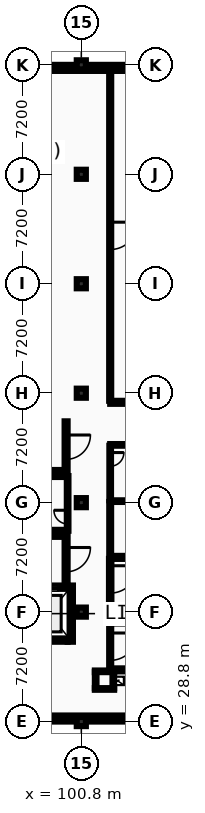
"""IFC4 building model, lengths in metres.
Left out: names, types, materials, properties, quantities, classifications, styles, units other than length and angle.
Written with IfcOpenShell. Run it as: python <this file> out.ifc"""

import sys

from ifc_helpers import new_model, si_unit, direction, frame, frame_2d, origin, origin_2d, place, context, subcontext, project, spatial, rectangle, extrude, element, fill, save


model = new_model("IFC4")
c1 = context("Model", 3, precision=1e-05, world=origin(), true_north=direction((0.0, 1.0)))
c2 = subcontext(c1, "Body", "Model", "MODEL_VIEW")
j1 = project(units=[si_unit("LENGTHUNIT", "METRE"), si_unit("PLANEANGLEUNIT", "RADIAN")], contexts=[c1])
p1 = place(None, origin())
s1 = spatial("IfcSite", under=j1, at=p1, CompositionType="ELEMENT")
p2 = place(p1, origin())
s2 = spatial("IfcBuilding", under=s1, at=p2, CompositionType="ELEMENT")
p3 = place(p2, frame((0.0, 0.0, -4.8)))
s3 = spatial("IfcBuildingStorey", under=s2, at=p3, CompositionType="ELEMENT", Elevation=-4.8)
for number, where, z_axis, x_axis in (
    (1, (100.8, 28.8, 0.0), (0.0, 0.0, 1.0), (1.0, 0.0, 0.0)),
    (2, (100.8, 36.0, 0.0), (0.0, 0.0, 1.0), (1.0, 0.0, 0.0)),
    (3, (100.8, 43.2, 0.0), (0.0, 0.0, 1.0), (1.0, 0.0, 0.0)),
    (4, (100.8, 50.4, 0.0), (0.0, 0.0, 1.0), (1.0, 0.0, 0.0)),
    (5, (100.8, 57.6, 0.0), (0.0, 0.0, 1.0), (1.0, 0.0, 0.0)),
    (6, (100.8, 64.8, 0.0), (0.0, 0.0, 1.0), (1.0, 0.0, 0.0)),
    (7, (100.8, 72.0, 0.0), (0.0, 0.0, 1.0), (1.0, 0.0, 0.0)),
):
    element("IfcColumn", number, at=place(p3, frame(where, z_axis=z_axis, x_axis=x_axis)), inside=s3, PredefinedType="COLUMN", context=c2, shape_type="SweptSolid", body=[
        extrude(rectangle(XDim=0.6, YDim=0.6, at=origin_2d()), origin(), (0.0, 0.0, 1.0), 4.8),
    ])
p4 = place(p3, frame((86.0, 29.0, 0.0), z_axis=(0.0, 0.0, 1.0), x_axis=(1.0, 0.0, 0.0)))
e8 = element("IfcWall", 8, at=p4, inside=s3, PredefinedType="USERDEFINED", context=c2, shape_type="SweptSolid", body=[
    extrude(rectangle(XDim=36.4, YDim=0.4, at=frame_2d((18.2, 0.0))), origin(), (0.0, 0.0, 1.0), 4.545),
])
p5 = place(p3, frame((122.4, 71.8, 0.0), z_axis=(0.0, 0.0, 1.0), x_axis=(-1.0, 0.0, 0.0)))
e9 = element("IfcWall", 9, at=p5, inside=s3, PredefinedType="USERDEFINED", context=c2, shape_type="SweptSolid", body=[
    extrude(rectangle(XDim=29.2, YDim=0.4, at=frame_2d((14.6, 0.0))), origin(), (0.0, 0.0, 1.0), 4.545),
])
p6 = place(p3, frame((97.45, 34.225, 0.0), z_axis=(0.0, 0.0, 1.0), x_axis=(1.0, 0.0, 0.0)))
e10 = element("IfcWall", 10, at=p6, inside=s3, PredefinedType="SHEAR", context=c2, shape_type="SweptSolid", body=[
    extrude(rectangle(XDim=2.45, YDim=0.35, at=frame_2d((1.225, 0.0))), origin(), (0.0, 0.0, 1.0), 4.545),
])
p7 = place(p3, frame((97.45, 37.575, 0.0), z_axis=(0.0, 0.0, 1.0), x_axis=(1.0, 0.0, 0.0)))
e11 = element("IfcWall", 11, at=p7, inside=s3, PredefinedType="SHEAR", context=c2, shape_type="SweptSolid", body=[
    extrude(rectangle(XDim=2.45, YDim=0.35, at=frame_2d((1.225, 0.0))), origin(), (0.0, 0.0, 1.0), 4.545),
])
p8 = place(p7, frame((0.625, 0.0, 0.0)))
e12 = element("IfcOpeningElement", 12, at=p8, cuts=e11, PredefinedType="OPENING", context=c2, shape_type="SweptSolid", body=[
    extrude(rectangle(XDim=1.2, YDim=2.2, at=frame_2d((0.6, 1.1))), frame((0.0, 0.185, 0.0), z_axis=(0.0, -1.0, 0.0), x_axis=(1.0, 0.0, 0.0)), (0.0, 0.0, 1.0), 0.37),
])
p9 = place(p3, frame((100.075, 34.05, 0.0), z_axis=(0.0, 0.0, 1.0), x_axis=(0.0, 1.0, 0.0)))
e13 = element("IfcWall", 13, at=p9, inside=s3, PredefinedType="SHEAR", context=c2, shape_type="SweptSolid", body=[
    extrude(rectangle(XDim=3.7, YDim=0.35, at=frame_2d((1.85, 0.0))), origin(), (0.0, 0.0, 1.0), 4.545),
])
p10 = place(p3, frame((99.8, 37.75, 0.0), z_axis=(0.0, 0.0, 1.0), x_axis=(0.0, 1.0, 0.0)))
e14 = element("IfcWall", 14, at=p10, inside=s3, PredefinedType="PARTITIONING", context=c2, shape_type="SweptSolid", body=[
    extrude(rectangle(XDim=3.4, YDim=0.2, at=frame_2d((1.7, 0.0))), origin(), (0.0, 0.0, 1.0), 4.545),
])
p11 = place(p10, frame((0.9, 0.0, 0.0)))
e15 = element("IfcOpeningElement", 15, at=p11, cuts=e14, PredefinedType="OPENING", context=c2, shape_type="SweptSolid", body=[
    extrude(rectangle(XDim=1.6, YDim=2.2, at=frame_2d((0.8, 1.1))), frame((0.0, 0.11, 0.0), z_axis=(0.0, -1.0, 0.0), x_axis=(1.0, 0.0, 0.0)), (0.0, 0.0, 1.0), 0.22),
])
p12 = place(p3, frame((93.95, 41.05, 0.0), z_axis=(0.0, 0.0, 1.0), x_axis=(1.0, 0.0, 0.0)))
e16 = element("IfcWall", 16, at=p12, inside=s3, PredefinedType="PARTITIONING", context=c2, shape_type="SweptSolid", body=[
    extrude(rectangle(XDim=5.75, YDim=0.2, at=frame_2d((2.875, 0.0))), origin(), (0.0, 0.0, 1.0), 4.545),
])
p13 = place(p3, frame((99.8, 45.15, 0.0), z_axis=(0.0, 0.0, 1.0), x_axis=(0.0, 1.0, 0.0)))
e17 = element("IfcWall", 17, at=p13, inside=s3, PredefinedType="PARTITIONING", context=c2, shape_type="SweptSolid", body=[
    extrude(rectangle(XDim=3.4, YDim=0.2, at=frame_2d((1.7, 0.0))), origin(), (0.0, 0.0, 1.0), 4.545),
])
p14 = place(p13, frame((0.9, 0.0, 0.0)))
e18 = element("IfcOpeningElement", 18, at=p14, cuts=e17, PredefinedType="OPENING", context=c2, shape_type="SweptSolid", body=[
    extrude(rectangle(XDim=1.6, YDim=2.2, at=frame_2d((0.8, 1.1))), frame((0.0, 0.11, 0.0), z_axis=(0.0, -1.0, 0.0), x_axis=(1.0, 0.0, 0.0)), (0.0, 0.0, 1.0), 0.22),
])
p15 = place(p3, frame((93.95, 45.25, 0.0), z_axis=(0.0, 0.0, 1.0), x_axis=(1.0, 0.0, 0.0)))
e19 = element("IfcWall", 19, at=p15, inside=s3, PredefinedType="PARTITIONING", context=c2, shape_type="SweptSolid", body=[
    extrude(rectangle(XDim=5.75, YDim=0.2, at=frame_2d((2.875, 0.0))), origin(), (0.0, 0.0, 1.0), 4.545),
])
for number, where, z_axis, x_axis in (
    (20, (101.69, 30.945, 0.0), (0.0, 0.0, 1.0), (1.0, 0.0, 0.0)),
    (21, (101.69, 32.105, 0.0), (0.0, 0.0, 1.0), (1.0, 0.0, 0.0)),
):
    element("IfcWall", number, at=place(p3, frame(where, z_axis=z_axis, x_axis=x_axis)), inside=s3, PredefinedType="PARTITIONING", context=c2, shape_type="SweptSolid", body=[
        extrude(rectangle(XDim=1.27, YDim=0.11, at=frame_2d((0.635, 0.0))), origin(), (0.0, 0.0, 1.0), 4.54),
    ])
for number, where, z_axis, x_axis in (
    (22, (101.745, 31.0, 0.0), (0.0, 0.0, 1.0), (0.0, 1.0, 0.0)),
    (23, (102.905, 31.0, 0.0), (0.0, 0.0, 1.0), (0.0, 1.0, 0.0)),
):
    element("IfcWall", number, at=place(p3, frame(where, z_axis=z_axis, x_axis=x_axis)), inside=s3, PredefinedType="PARTITIONING", context=c2, shape_type="SweptSolid", body=[
        extrude(rectangle(XDim=1.05, YDim=0.11, at=frame_2d((0.525, 0.0))), origin(), (0.0, 0.0, 1.0), 4.54),
    ])
p16 = place(p3, frame((103.035, 32.2, 0.0), z_axis=(0.0, 0.0, 1.0), x_axis=(1.0, 0.0, 0.0)))
e24 = element("IfcWall", 24, at=p16, inside=s3, PredefinedType="PARTITIONING", context=c2, shape_type="SweptSolid", body=[
    extrude(rectangle(XDim=18.945, YDim=0.2, at=frame_2d((9.473, 0.0))), origin(), (0.0, 0.0, 1.0), 4.545),
])
p17 = place(p3, frame((102.7, 35.35, 0.0), z_axis=(0.0, 0.0, 1.0), x_axis=(1.0, 0.0, 0.0)))
e25 = element("IfcWall", 25, at=p17, inside=s3, PredefinedType="PARTITIONING", context=c2, shape_type="SweptSolid", body=[
    extrude(rectangle(XDim=19.28, YDim=0.2, at=frame_2d((9.64, 0.0))), origin(), (0.0, 0.0, 1.0), 4.545),
])
p18 = place(p3, frame((102.7, 39.6, 0.0), z_axis=(0.0, 0.0, 1.0), x_axis=(1.0, 0.0, 0.0)))
e26 = element("IfcWall", 26, at=p18, inside=s3, PredefinedType="PARTITIONING", context=c2, shape_type="SweptSolid", body=[
    extrude(rectangle(XDim=19.5, YDim=0.2, at=frame_2d((9.75, 0.0))), origin(), (0.0, 0.0, 1.0), 4.545),
])
p19 = place(p3, frame((93.97, 41.35, 0.0), z_axis=(0.0, 0.0, 1.0), x_axis=(1.0, 0.0, 0.0)))
e27 = element("IfcWall", 27, at=p19, inside=s3, PredefinedType="PARTITIONING", context=c2, shape_type="SweptSolid", body=[
    extrude(rectangle(XDim=5.71, YDim=0.125, at=frame_2d((2.855, 0.0))), origin(), (0.0, 0.0, 1.0), 4.545),
])
p20 = place(p3, frame((102.7, 43.3, 0.0), z_axis=(0.0, 0.0, 1.0), x_axis=(1.0, 0.0, 0.0)))
e28 = element("IfcWall", 28, at=p20, inside=s3, PredefinedType="PARTITIONING", context=c2, shape_type="SweptSolid", body=[
    extrude(rectangle(XDim=4.92, YDim=0.11, at=frame_2d((2.46, 0.0))), origin(), (0.0, 0.0, 1.0), 4.095),
])
p21 = place(p3, frame((93.97, 44.95, 0.0), z_axis=(0.0, 0.0, 1.0), x_axis=(1.0, 0.0, 0.0)))
e29 = element("IfcWall", 29, at=p21, inside=s3, PredefinedType="PARTITIONING", context=c2, shape_type="SweptSolid", body=[
    extrude(rectangle(XDim=5.71, YDim=0.125, at=frame_2d((2.855, 0.0))), origin(), (0.0, 0.0, 1.0), 4.545),
])
p22 = place(p3, frame((102.7, 47.0, 0.0), z_axis=(0.0, 0.0, 1.0), x_axis=(1.0, 0.0, 0.0)))
e30 = element("IfcWall", 30, at=p22, inside=s3, PredefinedType="PARTITIONING", context=c2, shape_type="SweptSolid", body=[
    extrude(rectangle(XDim=19.5, YDim=0.11, at=frame_2d((9.75, 0.0))), origin(), (0.0, 0.0, 1.0), 4.545),
])
p23 = place(p3, frame((102.7, 49.8, 0.0), z_axis=(0.0, 0.0, 1.0), x_axis=(1.0, 0.0, 0.0)))
e31 = element("IfcWall", 31, at=p23, inside=s3, PredefinedType="PARTITIONING", context=c2, shape_type="SweptSolid", body=[
    extrude(rectangle(XDim=19.5, YDim=0.2, at=frame_2d((9.75, 0.0))), origin(), (0.0, 0.0, 1.0), 4.545),
])
p24 = place(p3, frame((99.9, 41.35, 0.0), z_axis=(0.0, 0.0, 1.0), x_axis=(0.0, 1.0, 0.0)))
e32 = element("IfcWall", 32, at=p24, inside=s3, PredefinedType="PARTITIONING", context=c2, shape_type="SweptSolid", body=[
    extrude(rectangle(XDim=3.6, YDim=0.11, at=frame_2d((1.8, 0.0))), origin(), (0.0, 0.0, 1.0), 4.545),
])
p25 = place(p24, frame((0.45, 0.0, 0.0)))
e33 = element("IfcOpeningElement", 33, at=p25, cuts=e32, PredefinedType="OPENING", context=c2, shape_type="SweptSolid", body=[
    extrude(rectangle(XDim=0.9, YDim=2.1, at=frame_2d((0.45, 1.05))), frame((0.0, 0.065, 0.0), z_axis=(0.0, -1.0, 0.0), x_axis=(1.0, 0.0, 0.0)), (0.0, 0.0, 1.0), 0.13),
])
p26 = place(p3, frame((102.7, 32.2, 0.0), z_axis=(0.0, 0.0, 1.0), x_axis=(0.0, 1.0, 0.0)))
e34 = element("IfcWall", 34, at=p26, inside=s3, PredefinedType="PARTITIONING", context=c2, shape_type="SweptSolid", body=[
    extrude(rectangle(XDim=3.05, YDim=0.135, at=frame_2d((1.525, 0.0))), origin(), (0.0, 0.0, 1.0), 4.545),
])
p27 = place(p26, frame((0.625, 0.0, 0.0)))
e35 = element("IfcOpeningElement", 35, at=p27, cuts=e34, PredefinedType="OPENING", context=c2, shape_type="SweptSolid", body=[
    extrude(rectangle(XDim=1.8, YDim=2.3, at=frame_2d((0.9, 1.15))), frame((0.0, 0.078, 0.0), z_axis=(0.0, -1.0, 0.0), x_axis=(1.0, 0.0, 0.0)), (0.0, 0.0, 1.0), 0.155),
])
p28 = place(p3, frame((102.7, 35.45, 0.0), z_axis=(0.0, 0.0, 1.0), x_axis=(0.0, 1.0, 0.0)))
e36 = element("IfcWall", 36, at=p28, inside=s3, PredefinedType="PARTITIONING", context=c2, shape_type="SweptSolid", body=[
    extrude(rectangle(XDim=4.05, YDim=0.16, at=frame_2d((2.025, 0.0))), origin(), (0.0, 0.0, 1.0), 4.545),
])
p29 = place(p28, frame((1.8, 0.0, 0.0)))
e37 = element("IfcOpeningElement", 37, at=p29, cuts=e36, PredefinedType="OPENING", context=c2, shape_type="SweptSolid", body=[
    extrude(rectangle(XDim=1.8, YDim=2.3, at=frame_2d((0.9, 1.15))), frame((0.0, 0.09, 0.0), z_axis=(0.0, -1.0, 0.0), x_axis=(1.0, 0.0, 0.0)), (0.0, 0.0, 1.0), 0.18),
])
p30 = place(p3, frame((102.7, 39.7, 0.0), z_axis=(0.0, 0.0, 1.0), x_axis=(0.0, 1.0, 0.0)))
e38 = element("IfcWall", 38, at=p30, inside=s3, PredefinedType="PARTITIONING", context=c2, shape_type="SweptSolid", body=[
    extrude(rectangle(XDim=3.545, YDim=0.125, at=frame_2d((1.772, 0.0))), origin(), (0.0, 0.0, 1.0), 4.545),
])
p31 = place(p30, frame((0.45, 0.0, 0.0)))
e39 = element("IfcOpeningElement", 39, at=p31, cuts=e38, PredefinedType="OPENING", context=c2, shape_type="SweptSolid", body=[
    extrude(rectangle(XDim=1.0, YDim=2.1, at=frame_2d((0.5, 1.05))), frame((0.0, 0.073, 0.0), z_axis=(0.0, -1.0, 0.0), x_axis=(1.0, 0.0, 0.0)), (0.0, 0.0, 1.0), 0.145),
])
p32 = place(p3, frame((102.7, 43.355, 0.0), z_axis=(0.0, 0.0, 1.0), x_axis=(0.0, 1.0, 0.0)))
e40 = element("IfcWall", 40, at=p32, inside=s3, PredefinedType="PARTITIONING", context=c2, shape_type="SweptSolid", body=[
    extrude(rectangle(XDim=3.59, YDim=0.11, at=frame_2d((1.795, 0.0))), origin(), (0.0, 0.0, 1.0), 4.545),
])
p33 = place(p32, frame((2.24, 0.0, 0.0)))
e41 = element("IfcOpeningElement", 41, at=p33, cuts=e40, PredefinedType="OPENING", context=c2, shape_type="SweptSolid", body=[
    extrude(rectangle(XDim=0.9, YDim=2.1, at=frame_2d((0.45, 1.05))), frame((0.0, 0.065, 0.0), z_axis=(0.0, -1.0, 0.0), x_axis=(1.0, 0.0, 0.0)), (0.0, 0.0, 1.0), 0.13),
])
p34 = place(p3, frame((102.7, 49.9, 0.0), z_axis=(0.0, 0.0, 1.0), x_axis=(0.0, 1.0, 0.0)))
e42 = element("IfcWall", 42, at=p34, inside=s3, PredefinedType="PARTITIONING", context=c2, shape_type="SweptSolid", body=[
    extrude(rectangle(XDim=21.7, YDim=0.135, at=frame_2d((10.85, 0.0))), origin(), (0.0, 0.0, 1.0), 4.545),
])
p35 = place(p34, frame((9.95, 0.0, 0.0)))
e43 = element("IfcOpeningElement", 43, at=p35, cuts=e42, PredefinedType="OPENING", context=c2, shape_type="SweptSolid", body=[
    extrude(rectangle(XDim=1.8, YDim=2.3, at=frame_2d((0.9, 1.15))), frame((0.0, 0.078, 0.0), z_axis=(0.0, -1.0, 0.0), x_axis=(1.0, 0.0, 0.0)), (0.0, 0.0, 1.0), 0.155),
])
p36 = place(p8, origin())
e44 = element("IfcDoor", 44, at=p36, inside=s3, OperationType="SLIDING_TO_RIGHT", PredefinedType="DOOR", context=c2, shape_type="SweptSolid", body=[
    extrude(rectangle(XDim=1.2, YDim=2.2, at=frame_2d((0.6, 1.1))), frame((0.0, 0.025, 0.0), z_axis=(0.0, -1.0, 0.0), x_axis=(1.0, 0.0, 0.0)), (0.0, 0.0, 1.0), 0.05),
])
fill(e12, e44)
p37 = place(p11, origin())
e45 = element("IfcDoor", 45, at=p37, inside=s3, OperationType="DOUBLE_DOOR_SINGLE_SWING", PredefinedType="DOOR", context=c2, shape_type="SweptSolid", body=[
    extrude(rectangle(XDim=1.6, YDim=2.2, at=frame_2d((0.8, 1.1))), frame((0.0, 0.025, 0.0), z_axis=(0.0, -1.0, 0.0), x_axis=(1.0, 0.0, 0.0)), (0.0, 0.0, 1.0), 0.05),
])
fill(e15, e45)
p38 = place(p14, origin())
e46 = element("IfcDoor", 46, at=p38, inside=s3, OperationType="DOUBLE_DOOR_SINGLE_SWING", PredefinedType="DOOR", context=c2, shape_type="SweptSolid", body=[
    extrude(rectangle(XDim=1.6, YDim=2.2, at=frame_2d((0.8, 1.1))), frame((0.0, 0.025, 0.0), z_axis=(0.0, -1.0, 0.0), x_axis=(1.0, 0.0, 0.0)), (0.0, 0.0, 1.0), 0.05),
])
fill(e18, e46)
p39 = place(p35, origin())
e47 = element("IfcDoor", 47, at=p39, inside=s3, OperationType="DOUBLE_DOOR_SINGLE_SWING", PredefinedType="DOOR", context=c2, shape_type="SweptSolid", body=[
    extrude(rectangle(XDim=1.8, YDim=2.3, at=frame_2d((0.9, 1.15))), frame((0.0, 0.025, 0.0), z_axis=(0.0, -1.0, 0.0), x_axis=(1.0, 0.0, 0.0)), (0.0, 0.0, 1.0), 0.05),
])
fill(e43, e47)
p40 = place(p27, origin())
e48 = element("IfcDoor", 48, at=p40, inside=s3, OperationType="DOUBLE_DOOR_SINGLE_SWING", PredefinedType="DOOR", context=c2, shape_type="SweptSolid", body=[
    extrude(rectangle(XDim=1.8, YDim=2.3, at=frame_2d((0.9, 1.15))), frame((0.0, 0.025, 0.0), z_axis=(0.0, -1.0, 0.0), x_axis=(1.0, 0.0, 0.0)), (0.0, 0.0, 1.0), 0.05),
])
fill(e35, e48)
p41 = place(p29, origin())
e49 = element("IfcDoor", 49, at=p41, inside=s3, OperationType="DOUBLE_DOOR_SINGLE_SWING", PredefinedType="DOOR", context=c2, shape_type="SweptSolid", body=[
    extrude(rectangle(XDim=1.8, YDim=2.3, at=frame_2d((0.9, 1.15))), frame((0.0, 0.025, 0.0), z_axis=(0.0, -1.0, 0.0), x_axis=(1.0, 0.0, 0.0)), (0.0, 0.0, 1.0), 0.05),
])
fill(e37, e49)
p42 = place(p31, origin())
e50 = element("IfcDoor", 50, at=p42, inside=s3, OperationType="SLIDING_TO_LEFT", PredefinedType="DOOR", context=c2, shape_type="SweptSolid", body=[
    extrude(rectangle(XDim=1.0, YDim=2.1, at=frame_2d((0.5, 1.05))), frame((0.0, 0.025, 0.0), z_axis=(0.0, -1.0, 0.0), x_axis=(1.0, 0.0, 0.0)), (0.0, 0.0, 1.0), 0.05),
])
fill(e39, e50)
p43 = place(p33, origin())
e51 = element("IfcDoor", 51, at=p43, inside=s3, OperationType="SINGLE_SWING_RIGHT", PredefinedType="DOOR", context=c2, shape_type="SweptSolid", body=[
    extrude(rectangle(XDim=0.9, YDim=2.1, at=frame_2d((0.45, 1.05))), frame((0.0, 0.025, 0.0), z_axis=(0.0, -1.0, 0.0), x_axis=(1.0, 0.0, 0.0)), (0.0, 0.0, 1.0), 0.05),
])
fill(e41, e51)
p44 = place(p25, frame((0.9, 0.0, 0.0), z_axis=(0.0, 0.0, 1.0), x_axis=(-1.0, 0.0, 0.0)))
e52 = element("IfcDoor", 52, at=p44, inside=s3, OperationType="SINGLE_SWING_RIGHT", PredefinedType="DOOR", context=c2, shape_type="SweptSolid", body=[
    extrude(rectangle(XDim=0.9, YDim=2.1, at=frame_2d((0.45, 1.05))), frame((0.0, 0.025, 0.0), z_axis=(0.0, -1.0, 0.0), x_axis=(1.0, 0.0, 0.0)), (0.0, 0.0, 1.0), 0.05),
])
fill(e33, e52)
save(model, sys.argv[1])
